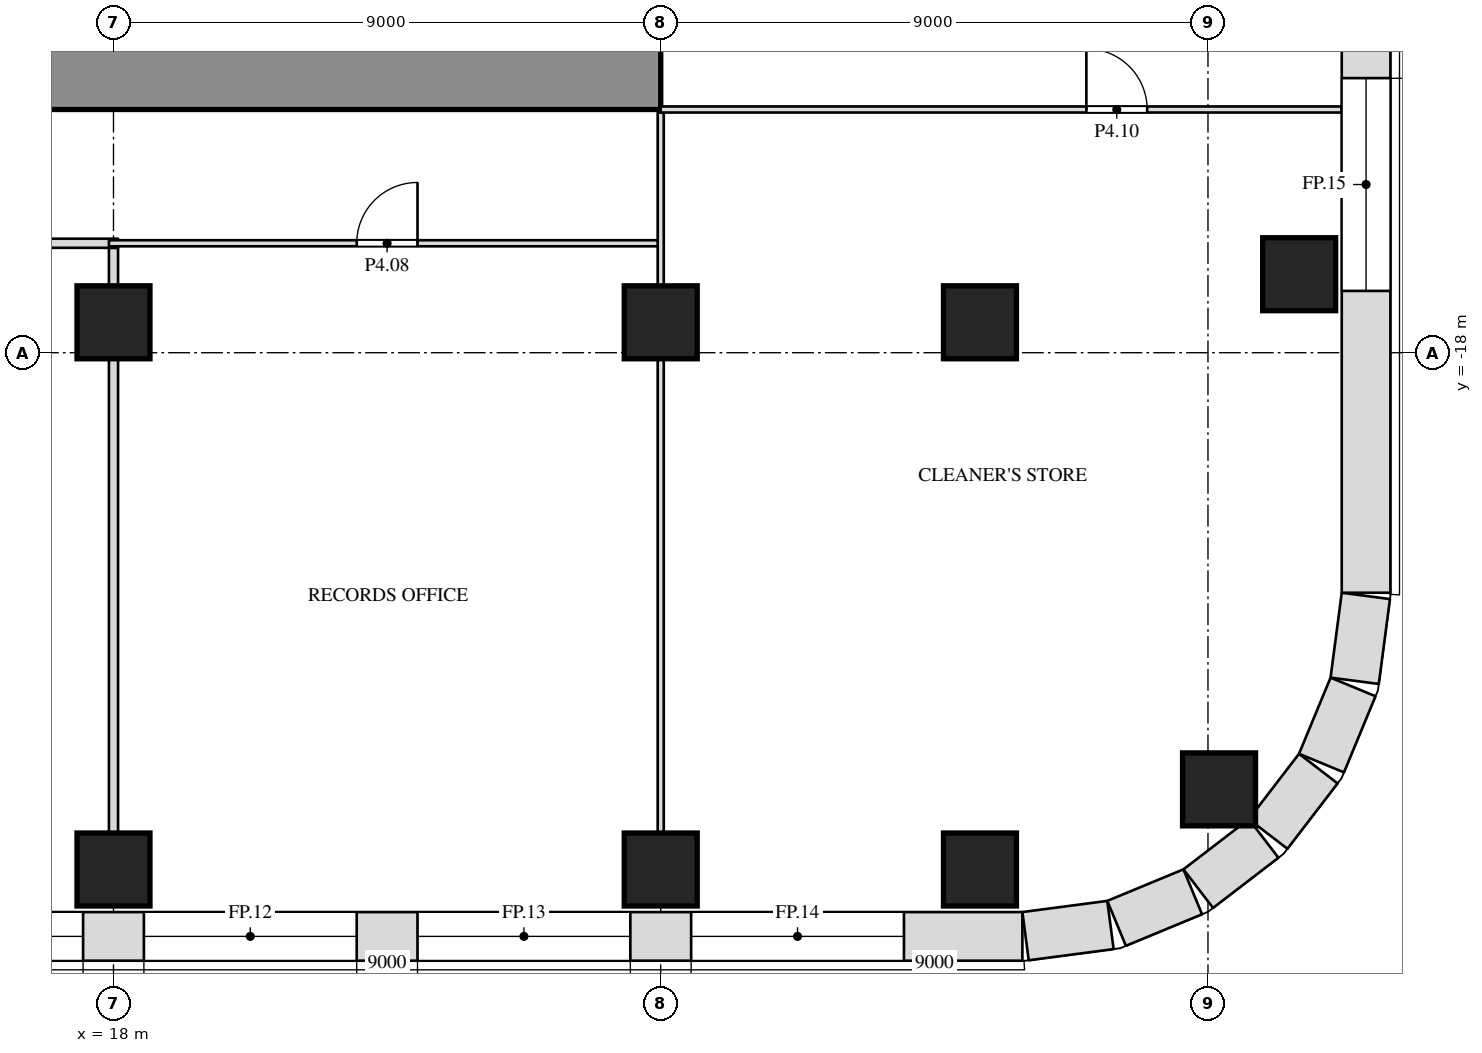
"""IFC4 building model, lengths in metres.
Left out: names, types, materials, properties, quantities, classifications, styles, units other than length and angle.
Written with IfcOpenShell. Run it as: python <this file> out.ifc"""

import sys

from ifc_helpers import new_model, si_unit, direction, frame, frame_2d, origin, origin_2d, place, context, subcontext, project, spatial, rectangle, extrude, element, fill, save


model = new_model("IFC4")
c1 = context("Model", 3, precision=1e-05, world=origin(), true_north=direction((0.0, 1.0)))
c2 = subcontext(c1, "Body", "Model", "MODEL_VIEW")
j1 = project(units=[si_unit("LENGTHUNIT", "METRE"), si_unit("PLANEANGLEUNIT", "RADIAN")], contexts=[c1])
p1 = place(None, origin())
s1 = spatial("IfcSite", under=j1, at=p1, CompositionType="ELEMENT")
p2 = place(p1, origin())
s2 = spatial("IfcBuilding", under=s1, at=p2, CompositionType="ELEMENT")
p3 = place(p2, frame((0.0, 0.0, 27.0)))
s3 = spatial("IfcBuildingStorey", under=s2, at=p3, CompositionType="ELEMENT", Elevation=27.0)
for number, where, z_axis, x_axis in (
    (1, (18.0, -26.5, 0.0), (0.0, 0.0, 1.0), (1.0, 0.0, 0.0)),
    (2, (27.0, -26.5, 0.0), (0.0, 0.0, 1.0), (1.0, 0.0, 0.0)),
    (3, (32.25, -26.5, 0.0), (0.0, 0.0, 1.0), (1.0, 0.0, 0.0)),
    (4, (36.182, -25.182, 0.0), (0.0, 0.0, 1.0), (1.0, 0.0, 0.0)),
    (5, (18.0, -17.5, 0.0), (0.0, 0.0, 1.0), (1.0, 0.0, 0.0)),
    (6, (27.0, -17.5, 0.0), (0.0, 0.0, 1.0), (1.0, 0.0, 0.0)),
    (7, (32.25, -17.5, 0.0), (0.0, 0.0, 1.0), (1.0, 0.0, 0.0)),
    (8, (37.5, -16.709, 0.0), (0.0, 0.0, 1.0), (1.0, 0.0, 0.0)),
):
    element("IfcColumn", number, at=place(p3, frame(where, z_axis=z_axis, x_axis=x_axis)), inside=s3, PredefinedType="COLUMN", context=c2, shape_type="SweptSolid", body=[
        extrude(rectangle(XDim=1.2, YDim=1.2, at=origin_2d()), origin(), (0.0, 0.0, 1.0), 6.0),
    ])
p4 = place(p3, frame((-27.0, -13.4, 0.0), z_axis=(0.0, 0.0, 1.0), x_axis=(1.0, 0.0, 0.0)))
e9 = element("IfcWall", 9, at=p4, inside=s3, PredefinedType="SHEAR", context=c2, shape_type="SweptSolid", body=[
    extrude(rectangle(XDim=54.0, YDim=1.2, at=frame_2d((27.0, 0.0))), origin(), (0.0, 0.0, 1.0), 5.7),
])
p5 = place(p4, frame((16.45, 0.0, 0.0)))
e10 = element("IfcOpeningElement", 10, at=p5, cuts=e9, PredefinedType="OPENING", context=c2, shape_type="SweptSolid", body=[
    extrude(rectangle(XDim=1.0, YDim=2.1, at=frame_2d((0.5, 1.05))), frame((0.0, 0.612, 0.0), z_axis=(0.0, -1.0, 0.0), x_axis=(1.0, 0.0, 0.0)), (0.0, 0.0, 1.0), 1.224),
])
p6 = place(p4, frame((36.55, 0.0, 0.0)))
e11 = element("IfcOpeningElement", 11, at=p6, cuts=e9, PredefinedType="OPENING", context=c2, shape_type="SweptSolid", body=[
    extrude(rectangle(XDim=1.0, YDim=2.1, at=frame_2d((0.5, 1.05))), frame((0.0, 0.612, 0.0), z_axis=(0.0, -1.0, 0.0), x_axis=(1.0, 0.0, 0.0)), (0.0, 0.0, 1.0), 1.224),
])
p7 = place(p3, frame((18.0, -25.9, 0.0), z_axis=(0.0, 0.0, 1.0), x_axis=(0.0, 1.0, 0.0)))
e12 = element("IfcWall", 12, at=p7, inside=s3, PredefinedType="PARTITIONING", context=c2, shape_type="SweptSolid", body=[
    extrude(rectangle(XDim=7.8, YDim=0.15, at=frame_2d((3.9, 0.0))), origin(), (0.0, 0.0, 1.0), 5.088),
])
p8 = place(p3, frame((18.0, -16.9, 0.0), z_axis=(0.0, 0.0, 1.0), x_axis=(0.0, 1.0, 0.0)))
e13 = element("IfcWall", 13, at=p8, inside=s3, PredefinedType="PARTITIONING", context=c2, shape_type="SweptSolid", body=[
    extrude(rectangle(XDim=0.625, YDim=0.15, at=frame_2d((0.312, 0.0))), origin(), (0.0, 0.0, 1.0), 5.7),
])
p9 = place(p3, frame((27.0, -25.9, 0.0), z_axis=(0.0, 0.0, 1.0), x_axis=(0.0, 1.0, 0.0)))
e14 = element("IfcWall", 14, at=p9, inside=s3, PredefinedType="PARTITIONING", context=c2, shape_type="SweptSolid", body=[
    extrude(rectangle(XDim=7.8, YDim=0.1, at=frame_2d((3.9, 0.0))), origin(), (0.0, 0.0, 1.0), 5.088),
])
p10 = place(p3, frame((27.0, -16.9, 0.0), z_axis=(0.0, 0.0, 1.0), x_axis=(0.0, 1.0, 0.0)))
e15 = element("IfcWall", 15, at=p10, inside=s3, PredefinedType="PARTITIONING", context=c2, shape_type="SweptSolid", body=[
    extrude(rectangle(XDim=2.85, YDim=0.1, at=frame_2d((1.425, 0.0))), origin(), (0.0, 0.0, 1.0), 5.088),
])
p11 = place(p3, frame((8.125, -16.2, 0.0), z_axis=(0.0, 0.0, 1.0), x_axis=(1.0, 0.0, 0.0)))
e16 = element("IfcWall", 16, at=p11, inside=s3, PredefinedType="PARTITIONING", context=c2, shape_type="SweptSolid", body=[
    extrude(rectangle(XDim=9.95, YDim=0.15, at=frame_2d((4.975, 0.0))), origin(), (0.0, 0.0, 1.0), 5.7),
])
p12 = place(p11, frame((4.875, 0.0, 0.0)))
e17 = element("IfcOpeningElement", 17, at=p12, cuts=e16, PredefinedType="OPENING", context=c2, shape_type="SweptSolid", body=[
    extrude(rectangle(XDim=1.0, YDim=2.1, at=frame_2d((0.5, 1.05))), frame((0.0, 0.087, 0.0), z_axis=(0.0, -1.0, 0.0), x_axis=(1.0, 0.0, 0.0)), (0.0, 0.0, 1.0), 0.174),
])
p13 = place(p3, frame((17.925, -16.2, 0.0), z_axis=(0.0, 0.0, 1.0), x_axis=(1.0, 0.0, 0.0)))
e18 = element("IfcWall", 18, at=p13, inside=s3, PredefinedType="PARTITIONING", context=c2, shape_type="SweptSolid", body=[
    extrude(rectangle(XDim=9.025, YDim=0.1, at=frame_2d((4.512, 0.0))), origin(), (0.0, 0.0, 1.0), 5.7),
])
p14 = place(p13, frame((4.075, 0.0, 0.0)))
e19 = element("IfcOpeningElement", 19, at=p14, cuts=e18, PredefinedType="OPENING", context=c2, shape_type="SweptSolid", body=[
    extrude(rectangle(XDim=1.0, YDim=2.1, at=frame_2d((0.5, 1.05))), frame((0.0, 0.062, 0.0), z_axis=(0.0, -1.0, 0.0), x_axis=(1.0, 0.0, 0.0)), (0.0, 0.0, 1.0), 0.124),
])
p15 = place(p3, frame((27.0, -14.0, 0.0), z_axis=(0.0, 0.0, 1.0), x_axis=(1.0, 0.0, 0.0)))
e20 = element("IfcWall", 20, at=p15, inside=s3, PredefinedType="PARTITIONING", context=c2, shape_type="SweptSolid", body=[
    extrude(rectangle(XDim=11.2, YDim=0.1, at=frame_2d((5.6, 0.0))), origin(), (0.0, 0.0, 1.0), 5.7),
])
p16 = place(p15, frame((7.0, 0.0, 0.0)))
e21 = element("IfcOpeningElement", 21, at=p16, cuts=e20, PredefinedType="OPENING", context=c2, shape_type="SweptSolid", body=[
    extrude(rectangle(XDim=1.0, YDim=2.1, at=frame_2d((0.5, 1.05))), frame((0.0, 0.062, 0.0), z_axis=(0.0, -1.0, 0.0), x_axis=(1.0, 0.0, 0.0)), (0.0, 0.0, 1.0), 0.124),
])
p17 = place(p3, frame((-32.948, -27.6, 0.0), z_axis=(0.0, 0.0, 1.0), x_axis=(1.0, 0.0, 0.0)))
e22 = element("IfcWall", 22, at=p17, inside=s3, PredefinedType="SOLIDWALL", context=c2, shape_type="SweptSolid", body=[
    extrude(rectangle(XDim=65.895, YDim=0.8, at=frame_2d((32.948, 0.0))), origin(), (0.0, 0.0, 1.0), 5.7),
])
p18 = place(p17, frame((1.948, 0.0, 1.0)))
e23 = element("IfcOpeningElement", 23, at=p18, cuts=e22, PredefinedType="OPENING", context=c2, shape_type="SweptSolid", body=[
    extrude(rectangle(XDim=3.5, YDim=4.0, at=frame_2d((1.75, 2.0))), frame((0.0, 0.412, 0.0), z_axis=(0.0, -1.0, 0.0), x_axis=(1.0, 0.0, 0.0)), (0.0, 0.0, 1.0), 0.824),
])
p19 = place(p17, frame((6.448, 0.0, 1.0)))
e24 = element("IfcOpeningElement", 24, at=p19, cuts=e22, PredefinedType="OPENING", context=c2, shape_type="SweptSolid", body=[
    extrude(rectangle(XDim=3.5, YDim=4.0, at=frame_2d((1.75, 2.0))), frame((0.0, 0.412, 0.0), z_axis=(0.0, -1.0, 0.0), x_axis=(1.0, 0.0, 0.0)), (0.0, 0.0, 1.0), 0.824),
])
p20 = place(p17, frame((10.948, 0.0, 1.0)))
e25 = element("IfcOpeningElement", 25, at=p20, cuts=e22, PredefinedType="OPENING", context=c2, shape_type="SweptSolid", body=[
    extrude(rectangle(XDim=3.5, YDim=4.0, at=frame_2d((1.75, 2.0))), frame((0.0, 0.412, 0.0), z_axis=(0.0, -1.0, 0.0), x_axis=(1.0, 0.0, 0.0)), (0.0, 0.0, 1.0), 0.824),
])
p21 = place(p17, frame((15.448, 0.0, 1.0)))
e26 = element("IfcOpeningElement", 26, at=p21, cuts=e22, PredefinedType="OPENING", context=c2, shape_type="SweptSolid", body=[
    extrude(rectangle(XDim=3.5, YDim=4.0, at=frame_2d((1.75, 2.0))), frame((0.0, 0.412, 0.0), z_axis=(0.0, -1.0, 0.0), x_axis=(1.0, 0.0, 0.0)), (0.0, 0.0, 1.0), 0.824),
])
p22 = place(p17, frame((19.948, 0.0, 1.0)))
e27 = element("IfcOpeningElement", 27, at=p22, cuts=e22, PredefinedType="OPENING", context=c2, shape_type="SweptSolid", body=[
    extrude(rectangle(XDim=3.5, YDim=4.0, at=frame_2d((1.75, 2.0))), frame((0.0, 0.412, 0.0), z_axis=(0.0, -1.0, 0.0), x_axis=(1.0, 0.0, 0.0)), (0.0, 0.0, 1.0), 0.824),
])
p23 = place(p17, frame((24.448, 0.0, 1.0)))
e28 = element("IfcOpeningElement", 28, at=p23, cuts=e22, PredefinedType="OPENING", context=c2, shape_type="SweptSolid", body=[
    extrude(rectangle(XDim=3.5, YDim=4.0, at=frame_2d((1.75, 2.0))), frame((0.0, 0.412, 0.0), z_axis=(0.0, -1.0, 0.0), x_axis=(1.0, 0.0, 0.0)), (0.0, 0.0, 1.0), 0.824),
])
p24 = place(p17, frame((28.948, 0.0, 1.0)))
e29 = element("IfcOpeningElement", 29, at=p24, cuts=e22, PredefinedType="OPENING", context=c2, shape_type="SweptSolid", body=[
    extrude(rectangle(XDim=3.5, YDim=4.0, at=frame_2d((1.75, 2.0))), frame((0.0, 0.412, 0.0), z_axis=(0.0, -1.0, 0.0), x_axis=(1.0, 0.0, 0.0)), (0.0, 0.0, 1.0), 0.824),
])
p25 = place(p17, frame((33.448, 0.0, 1.0)))
e30 = element("IfcOpeningElement", 30, at=p25, cuts=e22, PredefinedType="OPENING", context=c2, shape_type="SweptSolid", body=[
    extrude(rectangle(XDim=3.5, YDim=4.0, at=frame_2d((1.75, 2.0))), frame((0.0, 0.412, 0.0), z_axis=(0.0, -1.0, 0.0), x_axis=(1.0, 0.0, 0.0)), (0.0, 0.0, 1.0), 0.824),
])
p26 = place(p17, frame((37.948, 0.0, 1.0)))
e31 = element("IfcOpeningElement", 31, at=p26, cuts=e22, PredefinedType="OPENING", context=c2, shape_type="SweptSolid", body=[
    extrude(rectangle(XDim=3.5, YDim=4.0, at=frame_2d((1.75, 2.0))), frame((0.0, 0.412, 0.0), z_axis=(0.0, -1.0, 0.0), x_axis=(1.0, 0.0, 0.0)), (0.0, 0.0, 1.0), 0.824),
])
p27 = place(p17, frame((42.448, 0.0, 1.0)))
e32 = element("IfcOpeningElement", 32, at=p27, cuts=e22, PredefinedType="OPENING", context=c2, shape_type="SweptSolid", body=[
    extrude(rectangle(XDim=3.5, YDim=4.0, at=frame_2d((1.75, 2.0))), frame((0.0, 0.412, 0.0), z_axis=(0.0, -1.0, 0.0), x_axis=(1.0, 0.0, 0.0)), (0.0, 0.0, 1.0), 0.824),
])
p28 = place(p17, frame((46.948, 0.0, 1.0)))
e33 = element("IfcOpeningElement", 33, at=p28, cuts=e22, PredefinedType="OPENING", context=c2, shape_type="SweptSolid", body=[
    extrude(rectangle(XDim=3.5, YDim=4.0, at=frame_2d((1.75, 2.0))), frame((0.0, 0.412, 0.0), z_axis=(0.0, -1.0, 0.0), x_axis=(1.0, 0.0, 0.0)), (0.0, 0.0, 1.0), 0.824),
])
p29 = place(p17, frame((51.448, 0.0, 1.0)))
e34 = element("IfcOpeningElement", 34, at=p29, cuts=e22, PredefinedType="OPENING", context=c2, shape_type="SweptSolid", body=[
    extrude(rectangle(XDim=3.5, YDim=4.0, at=frame_2d((1.75, 2.0))), frame((0.0, 0.412, 0.0), z_axis=(0.0, -1.0, 0.0), x_axis=(1.0, 0.0, 0.0)), (0.0, 0.0, 1.0), 0.824),
])
p30 = place(p17, frame((55.948, 0.0, 1.0)))
e35 = element("IfcOpeningElement", 35, at=p30, cuts=e22, PredefinedType="OPENING", context=c2, shape_type="SweptSolid", body=[
    extrude(rectangle(XDim=3.5, YDim=4.0, at=frame_2d((1.75, 2.0))), frame((0.0, 0.412, 0.0), z_axis=(0.0, -1.0, 0.0), x_axis=(1.0, 0.0, 0.0)), (0.0, 0.0, 1.0), 0.824),
])
p31 = place(p17, frame((60.448, 0.0, 1.0)))
e36 = element("IfcOpeningElement", 36, at=p31, cuts=e22, PredefinedType="OPENING", context=c2, shape_type="SweptSolid", body=[
    extrude(rectangle(XDim=3.5, YDim=4.0, at=frame_2d((1.75, 2.0))), frame((0.0, 0.412, 0.0), z_axis=(0.0, -1.0, 0.0), x_axis=(1.0, 0.0, 0.0)), (0.0, 0.0, 1.0), 0.824),
])
p32 = place(p3, frame((33.0, -27.597, 0.0), z_axis=(0.0, 0.0, 1.0), x_axis=(0.99144603414, 0.130517283865, 0.0)))
e37 = element("IfcWall", 37, at=p32, inside=s3, PredefinedType="SOLIDWALL", context=c2, shape_type="SweptSolid", body=[
    extrude(rectangle(XDim=1.408, YDim=0.8, at=frame_2d((0.704, 0.0))), origin(), (0.0, 0.0, 1.0), 5.7),
])
p33 = place(p3, frame((34.497, -27.386, 0.0), z_axis=(0.0, 0.0, 1.0), x_axis=(0.923847774587, 0.38276009378, 0.0)))
e38 = element("IfcWall", 38, at=p33, inside=s3, PredefinedType="SOLIDWALL", context=c2, shape_type="SweptSolid", body=[
    extrude(rectangle(XDim=1.355, YDim=0.8, at=frame_2d((0.678, 0.0))), origin(), (0.0, 0.0, 1.0), 5.7),
])
for number, where, z_axis, x_axis in (
    (39, (35.84, -26.815, 0.0), (0.0, 0.0, 1.0), (0.793, 0.609, 0.0)),
    (40, (36.989, -25.916, 0.0), (0.0, 0.0, 1.0), (0.609, 0.793, 0.0)),
):
    element("IfcWall", number, at=place(p3, frame(where, z_axis=z_axis, x_axis=x_axis)), inside=s3, PredefinedType="SOLIDWALL", context=c2, shape_type="SweptSolid", body=[
        extrude(rectangle(XDim=1.356, YDim=0.8, at=frame_2d((0.678, 0.0))), origin(), (0.0, 0.0, 1.0), 5.7),
    ])
p34 = place(p3, frame((37.867, -24.75, 0.0), z_axis=(0.0, 0.0, 1.0), x_axis=(0.38276009378, 0.923847774587, 0.0)))
e41 = element("IfcWall", 41, at=p34, inside=s3, PredefinedType="SOLIDWALL", context=c2, shape_type="SweptSolid", body=[
    extrude(rectangle(XDim=1.355, YDim=0.8, at=frame_2d((0.678, 0.0))), origin(), (0.0, 0.0, 1.0), 5.7),
])
p35 = place(p3, frame((38.413, -23.396, 0.0), z_axis=(0.0, 0.0, 1.0), x_axis=(0.130517283865, 0.99144603414, 0.0)))
e42 = element("IfcWall", 42, at=p35, inside=s3, PredefinedType="SOLIDWALL", context=c2, shape_type="SweptSolid", body=[
    extrude(rectangle(XDim=1.408, YDim=0.8, at=frame_2d((0.704, 0.0))), origin(), (0.0, 0.0, 1.0), 5.7),
])
p36 = place(p3, frame((38.6, -21.948, 0.0), z_axis=(0.0, 0.0, 1.0), x_axis=(0.0, 1.0, 0.0)))
e43 = element("IfcWall", 43, at=p36, inside=s3, PredefinedType="SOLIDWALL", context=c2, shape_type="SweptSolid", body=[
    extrude(rectangle(XDim=35.895, YDim=0.8, at=frame_2d((17.948, 0.0))), origin(), (0.0, 0.0, 1.0), 5.7),
])
p37 = place(p36, frame((4.964, 0.0, 1.0)))
e44 = element("IfcOpeningElement", 44, at=p37, cuts=e43, PredefinedType="OPENING", context=c2, shape_type="SweptSolid", body=[
    extrude(rectangle(XDim=3.5, YDim=4.0, at=frame_2d((1.75, 2.0))), frame((0.0, 0.412, 0.0), z_axis=(0.0, -1.0, 0.0), x_axis=(1.0, 0.0, 0.0)), (0.0, 0.0, 1.0), 0.824),
])
p38 = place(p36, frame((9.458, 0.0, 1.0)))
e45 = element("IfcOpeningElement", 45, at=p38, cuts=e43, PredefinedType="OPENING", context=c2, shape_type="SweptSolid", body=[
    extrude(rectangle(XDim=3.5, YDim=4.0, at=frame_2d((1.75, 2.0))), frame((0.0, 0.412, 0.0), z_axis=(0.0, -1.0, 0.0), x_axis=(1.0, 0.0, 0.0)), (0.0, 0.0, 1.0), 0.824),
])
p39 = place(p36, frame((13.951, 0.0, 1.0)))
e46 = element("IfcOpeningElement", 46, at=p39, cuts=e43, PredefinedType="OPENING", context=c2, shape_type="SweptSolid", body=[
    extrude(rectangle(XDim=3.5, YDim=4.0, at=frame_2d((1.75, 2.0))), frame((0.0, 0.412, 0.0), z_axis=(0.0, -1.0, 0.0), x_axis=(1.0, 0.0, 0.0)), (0.0, 0.0, 1.0), 0.824),
])
p40 = place(p36, frame((18.444, 0.0, 1.0)))
e47 = element("IfcOpeningElement", 47, at=p40, cuts=e43, PredefinedType="OPENING", context=c2, shape_type="SweptSolid", body=[
    extrude(rectangle(XDim=3.5, YDim=4.0, at=frame_2d((1.75, 2.0))), frame((0.0, 0.412, 0.0), z_axis=(0.0, -1.0, 0.0), x_axis=(1.0, 0.0, 0.0)), (0.0, 0.0, 1.0), 0.824),
])
p41 = place(p36, frame((22.938, 0.0, 1.0)))
e48 = element("IfcOpeningElement", 48, at=p41, cuts=e43, PredefinedType="OPENING", context=c2, shape_type="SweptSolid", body=[
    extrude(rectangle(XDim=3.5, YDim=4.0, at=frame_2d((1.75, 2.0))), frame((0.0, 0.412, 0.0), z_axis=(0.0, -1.0, 0.0), x_axis=(1.0, 0.0, 0.0)), (0.0, 0.0, 1.0), 0.824),
])
p42 = place(p36, frame((27.431, 0.0, 1.0)))
e49 = element("IfcOpeningElement", 49, at=p42, cuts=e43, PredefinedType="OPENING", context=c2, shape_type="SweptSolid", body=[
    extrude(rectangle(XDim=3.5, YDim=4.0, at=frame_2d((1.75, 2.0))), frame((0.0, 0.412, 0.0), z_axis=(0.0, -1.0, 0.0), x_axis=(1.0, 0.0, 0.0)), (0.0, 0.0, 1.0), 0.824),
])
p43 = place(p14, origin())
e50 = element("IfcDoor", 50, at=p43, inside=s3, OperationType="SINGLE_SWING_RIGHT", PredefinedType="DOOR", context=c2, shape_type="SweptSolid", body=[
    extrude(rectangle(XDim=1.0, YDim=2.1, at=frame_2d((0.5, 1.05))), frame((0.0, 0.025, 0.0), z_axis=(0.0, -1.0, 0.0), x_axis=(1.0, 0.0, 0.0)), (0.0, 0.0, 1.0), 0.05),
])
fill(e19, e50)
p44 = place(p16, origin())
e51 = element("IfcDoor", 51, at=p44, inside=s3, OperationType="SINGLE_SWING_LEFT", PredefinedType="DOOR", context=c2, shape_type="SweptSolid", body=[
    extrude(rectangle(XDim=1.0, YDim=2.1, at=frame_2d((0.5, 1.05))), frame((0.0, 0.025, 0.0), z_axis=(0.0, -1.0, 0.0), x_axis=(1.0, 0.0, 0.0)), (0.0, 0.0, 1.0), 0.05),
])
fill(e21, e51)
p45 = place(p28, origin())
e52 = element("IfcWindow", 52, at=p45, inside=s3, PartitioningType="SINGLE_PANEL", PredefinedType="WINDOW", context=c2, shape_type="SweptSolid", body=[
    extrude(rectangle(XDim=3.5, YDim=4.0, at=frame_2d((1.75, 2.0))), frame((0.0, 0.03, 0.0), z_axis=(0.0, -1.0, 0.0), x_axis=(1.0, 0.0, 0.0)), (0.0, 0.0, 1.0), 0.06),
])
fill(e33, e52)
p46 = place(p29, origin())
e53 = element("IfcWindow", 53, at=p46, inside=s3, PartitioningType="SINGLE_PANEL", PredefinedType="WINDOW", context=c2, shape_type="SweptSolid", body=[
    extrude(rectangle(XDim=3.5, YDim=4.0, at=frame_2d((1.75, 2.0))), frame((0.0, 0.03, 0.0), z_axis=(0.0, -1.0, 0.0), x_axis=(1.0, 0.0, 0.0)), (0.0, 0.0, 1.0), 0.06),
])
fill(e34, e53)
p47 = place(p30, origin())
e54 = element("IfcWindow", 54, at=p47, inside=s3, PartitioningType="SINGLE_PANEL", PredefinedType="WINDOW", context=c2, shape_type="SweptSolid", body=[
    extrude(rectangle(XDim=3.5, YDim=4.0, at=frame_2d((1.75, 2.0))), frame((0.0, 0.03, 0.0), z_axis=(0.0, -1.0, 0.0), x_axis=(1.0, 0.0, 0.0)), (0.0, 0.0, 1.0), 0.06),
])
fill(e35, e54)
p48 = place(p31, origin())
e55 = element("IfcWindow", 55, at=p48, inside=s3, PartitioningType="SINGLE_PANEL", PredefinedType="WINDOW", context=c2, shape_type="SweptSolid", body=[
    extrude(rectangle(XDim=3.5, YDim=4.0, at=frame_2d((1.75, 2.0))), frame((0.0, 0.03, 0.0), z_axis=(0.0, -1.0, 0.0), x_axis=(1.0, 0.0, 0.0)), (0.0, 0.0, 1.0), 0.06),
])
fill(e36, e55)
p49 = place(p37, origin())
e56 = element("IfcWindow", 56, at=p49, inside=s3, PartitioningType="SINGLE_PANEL", PredefinedType="WINDOW", context=c2, shape_type="SweptSolid", body=[
    extrude(rectangle(XDim=3.5, YDim=4.0, at=frame_2d((1.75, 2.0))), frame((0.0, 0.03, 0.0), z_axis=(0.0, -1.0, 0.0), x_axis=(1.0, 0.0, 0.0)), (0.0, 0.0, 1.0), 0.06),
])
fill(e44, e56)
save(model, sys.argv[1])
